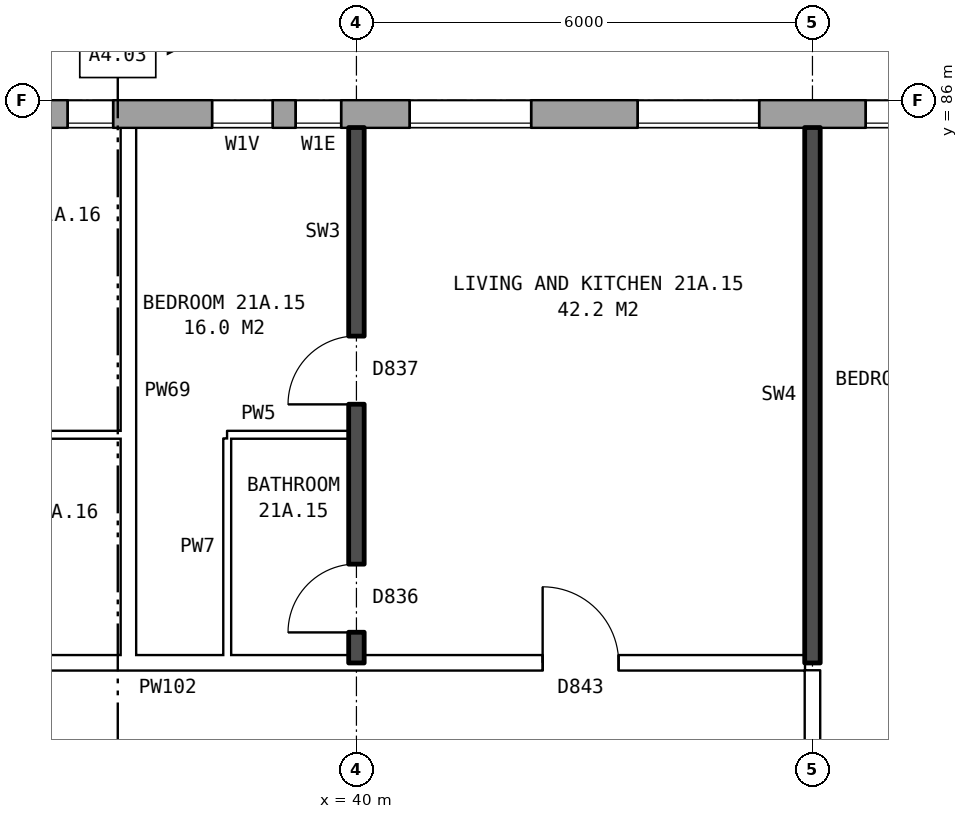
"""IFC4 building model, lengths in metres.
Left out: names, types, materials, properties, quantities, classifications, styles, units other than length and angle.
Written with IfcOpenShell. Run it as: python <this file> out.ifc"""

import sys

from ifc_helpers import new_model, si_unit, direction, frame, frame_2d, origin, place, context, subcontext, project, spatial, rectangle, extrude, element, fill, save


model = new_model("IFC4")
c1 = context("Model", 3, precision=1e-05, world=origin(), true_north=direction((0.0, 1.0)))
c2 = subcontext(c1, "Body", "Model", "MODEL_VIEW")
j1 = project(units=[si_unit("LENGTHUNIT", "METRE"), si_unit("PLANEANGLEUNIT", "RADIAN")], contexts=[c1])
p1 = place(None, origin())
s1 = spatial("IfcSite", under=j1, at=p1, CompositionType="ELEMENT")
p2 = place(p1, origin())
s2 = spatial("IfcBuilding", under=s1, at=p2, CompositionType="ELEMENT")
p3 = place(p2, frame((0.0, 0.0, 77.8)))
s3 = spatial("IfcBuildingStorey", under=s2, at=p3, CompositionType="ELEMENT", Elevation=77.8)
p4 = place(p3, frame((72.925, 85.82, 0.0), z_axis=(0.0, 0.0, 1.0), x_axis=(-1.0, 0.0, 0.0)))
e1 = element("IfcWall", 1, at=p4, inside=s3, PredefinedType="STANDARD", context=c2, shape_type="SweptSolid", body=[
    extrude(rectangle(XDim=46.601, YDim=0.36, at=frame_2d((23.3, 0.0))), origin(), (0.0, 0.0, 1.0), 2.85),
])
p5 = place(p4, frame((0.625, 0.0, 0.8)))
e2 = element("IfcOpeningElement", 2, at=p5, cuts=e1, PredefinedType="OPENING", context=c2, shape_type="SweptSolid", body=[
    extrude(rectangle(XDim=1.6, YDim=1.8, at=frame_2d((0.8, 0.9))), frame((0.0, 0.19, 0.0), z_axis=(0.0, -1.0, 0.0), x_axis=(1.0, 0.0, 0.0)), (0.0, 0.0, 1.0), 0.38),
])
p6 = place(p4, frame((3.625, 0.0, 0.8)))
e3 = element("IfcOpeningElement", 3, at=p6, cuts=e1, PredefinedType="OPENING", context=c2, shape_type="SweptSolid", body=[
    extrude(rectangle(XDim=1.6, YDim=1.8, at=frame_2d((0.8, 0.9))), frame((0.0, 0.19, 0.0), z_axis=(0.0, -1.0, 0.0), x_axis=(1.0, 0.0, 0.0)), (0.0, 0.0, 1.0), 0.38),
])
p7 = place(p4, frame((6.625, 0.0, 0.8)))
e4 = element("IfcOpeningElement", 4, at=p7, cuts=e1, PredefinedType="OPENING", context=c2, shape_type="SweptSolid", body=[
    extrude(rectangle(XDim=1.6, YDim=1.8, at=frame_2d((0.8, 0.9))), frame((0.0, 0.19, 0.0), z_axis=(0.0, -1.0, 0.0), x_axis=(1.0, 0.0, 0.0)), (0.0, 0.0, 1.0), 0.38),
])
p8 = place(p4, frame((9.125, 0.0, 1.65)))
e5 = element("IfcOpeningElement", 5, at=p8, cuts=e1, PredefinedType="OPENING", context=c2, shape_type="SweptSolid", body=[
    extrude(rectangle(XDim=1.4, YDim=0.9, at=frame_2d((0.7, 0.45))), frame((0.0, 0.19, 0.0), z_axis=(0.0, -1.0, 0.0), x_axis=(1.0, 0.0, 0.0)), (0.0, 0.0, 1.0), 0.38),
])
p9 = place(p4, frame((12.625, 0.0, 0.8)))
e6 = element("IfcOpeningElement", 6, at=p9, cuts=e1, PredefinedType="OPENING", context=c2, shape_type="SweptSolid", body=[
    extrude(rectangle(XDim=1.6, YDim=1.8, at=frame_2d((0.8, 0.9))), frame((0.0, 0.19, 0.0), z_axis=(0.0, -1.0, 0.0), x_axis=(1.0, 0.0, 0.0)), (0.0, 0.0, 1.0), 0.38),
])
p10 = place(p4, frame((15.625, 0.0, 0.8)))
e7 = element("IfcOpeningElement", 7, at=p10, cuts=e1, PredefinedType="OPENING", context=c2, shape_type="SweptSolid", body=[
    extrude(rectangle(XDim=1.6, YDim=1.8, at=frame_2d((0.8, 0.9))), frame((0.0, 0.19, 0.0), z_axis=(0.0, -1.0, 0.0), x_axis=(1.0, 0.0, 0.0)), (0.0, 0.0, 1.0), 0.38),
])
p11 = place(p4, frame((18.625, 0.0, 0.8)))
e8 = element("IfcOpeningElement", 8, at=p11, cuts=e1, PredefinedType="OPENING", context=c2, shape_type="SweptSolid", body=[
    extrude(rectangle(XDim=1.6, YDim=1.8, at=frame_2d((0.8, 0.9))), frame((0.0, 0.19, 0.0), z_axis=(0.0, -1.0, 0.0), x_axis=(1.0, 0.0, 0.0)), (0.0, 0.0, 1.0), 0.38),
])
p12 = place(p4, frame((21.625, 0.0, 0.8)))
e9 = element("IfcOpeningElement", 9, at=p12, cuts=e1, PredefinedType="OPENING", context=c2, shape_type="SweptSolid", body=[
    extrude(rectangle(XDim=1.6, YDim=1.8, at=frame_2d((0.8, 0.9))), frame((0.0, 0.19, 0.0), z_axis=(0.0, -1.0, 0.0), x_axis=(1.0, 0.0, 0.0)), (0.0, 0.0, 1.0), 0.38),
])
p13 = place(p4, frame((24.625, 0.0, 0.8)))
e10 = element("IfcOpeningElement", 10, at=p13, cuts=e1, PredefinedType="OPENING", context=c2, shape_type="SweptSolid", body=[
    extrude(rectangle(XDim=1.6, YDim=1.8, at=frame_2d((0.8, 0.9))), frame((0.0, 0.19, 0.0), z_axis=(0.0, -1.0, 0.0), x_axis=(1.0, 0.0, 0.0)), (0.0, 0.0, 1.0), 0.38),
])
p14 = place(p4, frame((27.625, 0.0, 0.8)))
e11 = element("IfcOpeningElement", 11, at=p14, cuts=e1, PredefinedType="OPENING", context=c2, shape_type="SweptSolid", body=[
    extrude(rectangle(XDim=1.6, YDim=1.8, at=frame_2d((0.8, 0.9))), frame((0.0, 0.19, 0.0), z_axis=(0.0, -1.0, 0.0), x_axis=(1.0, 0.0, 0.0)), (0.0, 0.0, 1.0), 0.38),
])
p15 = place(p4, frame((30.625, 0.0, 0.8)))
e12 = element("IfcOpeningElement", 12, at=p15, cuts=e1, PredefinedType="OPENING", context=c2, shape_type="SweptSolid", body=[
    extrude(rectangle(XDim=1.6, YDim=1.8, at=frame_2d((0.8, 0.9))), frame((0.0, 0.19, 0.0), z_axis=(0.0, -1.0, 0.0), x_axis=(1.0, 0.0, 0.0)), (0.0, 0.0, 1.0), 0.38),
])
p16 = place(p4, frame((33.125, 0.0, 0.75)))
e13 = element("IfcOpeningElement", 13, at=p16, cuts=e1, PredefinedType="OPENING", context=c2, shape_type="SweptSolid", body=[
    extrude(rectangle(XDim=0.6, YDim=1.8, at=frame_2d((0.3, 0.9))), frame((0.0, 0.19, 0.0), z_axis=(0.0, -1.0, 0.0), x_axis=(1.0, 0.0, 0.0)), (0.0, 0.0, 1.0), 0.38),
])
p17 = place(p4, frame((36.125, 0.0, 1.6)))
e14 = element("IfcOpeningElement", 14, at=p17, cuts=e1, PredefinedType="OPENING", context=c2, shape_type="SweptSolid", body=[
    extrude(rectangle(XDim=0.6, YDim=0.9, at=frame_2d((0.3, 0.45))), frame((0.0, 0.19, 0.0), z_axis=(0.0, -1.0, 0.0), x_axis=(1.0, 0.0, 0.0)), (0.0, 0.0, 1.0), 0.38),
])
p18 = place(p4, frame((39.625, 0.0, 0.8)))
e15 = element("IfcOpeningElement", 15, at=p18, cuts=e1, PredefinedType="OPENING", context=c2, shape_type="SweptSolid", body=[
    extrude(rectangle(XDim=1.6, YDim=1.8, at=frame_2d((0.8, 0.9))), frame((0.0, 0.19, 0.0), z_axis=(0.0, -1.0, 0.0), x_axis=(1.0, 0.0, 0.0)), (0.0, 0.0, 1.0), 0.38),
])
p19 = place(p4, frame((42.625, 0.0, 0.8)))
e16 = element("IfcOpeningElement", 16, at=p19, cuts=e1, PredefinedType="OPENING", context=c2, shape_type="SweptSolid", body=[
    extrude(rectangle(XDim=1.6, YDim=1.8, at=frame_2d((0.8, 0.9))), frame((0.0, 0.19, 0.0), z_axis=(0.0, -1.0, 0.0), x_axis=(1.0, 0.0, 0.0)), (0.0, 0.0, 1.0), 0.38),
])
p20 = place(p4, frame((11.125, 0.0, 0.15)))
e17 = element("IfcOpeningElement", 17, at=p20, cuts=e1, PredefinedType="OPENING", context=c2, shape_type="SweptSolid", body=[
    extrude(rectangle(XDim=0.6, YDim=0.9, at=frame_2d((0.3, 0.45))), frame((0.0, 0.19, 0.0), z_axis=(0.0, -1.0, 0.0), x_axis=(1.0, 0.0, 0.0)), (0.0, 0.0, 1.0), 0.38),
])
p21 = place(p4, frame((34.025, 0.0, 0.65)))
e18 = element("IfcOpeningElement", 18, at=p21, cuts=e1, PredefinedType="OPENING", context=c2, shape_type="SweptSolid", body=[
    extrude(rectangle(XDim=0.8, YDim=0.9, at=frame_2d((0.4, 0.45))), frame((0.0, 0.19, 0.0), z_axis=(0.0, -1.0, 0.0), x_axis=(1.0, 0.0, 0.0)), (0.0, 0.0, 1.0), 0.38),
])
p22 = place(p4, frame((37.025, 0.0, 0.8)))
e19 = element("IfcOpeningElement", 19, at=p22, cuts=e1, PredefinedType="OPENING", context=c2, shape_type="SweptSolid", body=[
    extrude(rectangle(XDim=1.6, YDim=1.8, at=frame_2d((0.8, 0.9))), frame((0.0, 0.19, 0.0), z_axis=(0.0, -1.0, 0.0), x_axis=(1.0, 0.0, 0.0)), (0.0, 0.0, 1.0), 0.38),
])
p23 = place(p3, frame((23.61, 78.6, 0.0), z_axis=(0.0, 0.0, 1.0), x_axis=(1.0, 0.0, 0.0)))
e20 = element("IfcWall", 20, at=p23, inside=s3, PredefinedType="PARTITIONING", context=c2, shape_type="SweptSolid", body=[
    extrude(rectangle(XDim=22.29, YDim=0.2, at=frame_2d((11.145, 0.0))), origin(), (0.0, 0.0, 1.0), 2.85),
])
p24 = place(p23, frame((18.84, 0.0, 0.0)))
e21 = element("IfcOpeningElement", 21, at=p24, cuts=e20, PredefinedType="OPENING", context=c2, shape_type="SweptSolid", body=[
    extrude(rectangle(XDim=1.0, YDim=2.1, at=frame_2d((0.5, 1.05))), frame((0.0, 0.11, 0.0), z_axis=(0.0, -1.0, 0.0), x_axis=(1.0, 0.0, 0.0)), (0.0, 0.0, 1.0), 0.22),
])
p25 = place(p23, frame((6.89, 0.0, 0.0)))
e22 = element("IfcOpeningElement", 22, at=p25, cuts=e20, PredefinedType="OPENING", context=c2, shape_type="SweptSolid", body=[
    extrude(rectangle(XDim=1.0, YDim=2.1, at=frame_2d((0.5, 1.05))), frame((0.0, 0.11, 0.0), z_axis=(0.0, -1.0, 0.0), x_axis=(1.0, 0.0, 0.0)), (0.0, 0.0, 1.0), 0.22),
])
p26 = place(p3, frame((34.1, 81.6, 0.0), z_axis=(0.0, 0.0, 1.0), x_axis=(1.0, 0.0, 0.0)))
e23 = element("IfcWall", 23, at=p26, inside=s3, PredefinedType="PARTITIONING", context=c2, shape_type="SweptSolid", body=[
    extrude(rectangle(XDim=2.8, YDim=0.1, at=frame_2d((1.4, 0.0))), origin(), (0.0, 0.0, 1.0), 2.85),
])
p27 = place(p3, frame((38.3, 81.6, 0.0), z_axis=(0.0, 0.0, 1.0), x_axis=(1.0, 0.0, 0.0)))
e24 = element("IfcWall", 24, at=p27, inside=s3, PredefinedType="PARTITIONING", context=c2, shape_type="SweptSolid", body=[
    extrude(rectangle(XDim=1.6, YDim=0.1, at=frame_2d((0.8, 0.0))), origin(), (0.0, 0.0, 1.0), 2.85),
])
p28 = place(p3, frame((37.0, 78.7, 0.0), z_axis=(0.0, 0.0, 1.0), x_axis=(0.0, 1.0, 0.0)))
e25 = element("IfcWall", 25, at=p28, inside=s3, PredefinedType="PARTITIONING", context=c2, shape_type="SweptSolid", body=[
    extrude(rectangle(XDim=6.94, YDim=0.2, at=frame_2d((3.47, 0.0))), origin(), (0.0, 0.0, 1.0), 2.85),
])
p29 = place(p3, frame((38.3, 78.7, 0.0), z_axis=(0.0, 0.0, 1.0), x_axis=(0.0, 1.0, 0.0)))
e26 = element("IfcWall", 26, at=p29, inside=s3, PredefinedType="PARTITIONING", context=c2, shape_type="SweptSolid", body=[
    extrude(rectangle(XDim=2.85, YDim=0.1, at=frame_2d((1.425, 0.0))), origin(), (0.0, 0.0, 1.0), 2.85),
])
p30 = place(p3, frame((40.0, 78.6, 0.0), z_axis=(0.0, 0.0, 1.0), x_axis=(0.0, 1.0, 0.0)))
e27 = element("IfcWall", 27, at=p30, inside=s3, PredefinedType="SOLIDWALL", context=c2, shape_type="SweptSolid", body=[
    extrude(rectangle(XDim=7.04, YDim=0.2, at=frame_2d((3.52, 0.0))), origin(), (0.0, 0.0, 1.0), 2.85),
])
p31 = place(p30, frame((3.4, 0.0, 0.0)))
e28 = element("IfcOpeningElement", 28, at=p31, cuts=e27, PredefinedType="OPENING", context=c2, shape_type="SweptSolid", body=[
    extrude(rectangle(XDim=0.9, YDim=2.1, at=frame_2d((0.45, 1.05))), frame((0.0, 0.11, 0.0), z_axis=(0.0, -1.0, 0.0), x_axis=(1.0, 0.0, 0.0)), (0.0, 0.0, 1.0), 0.22),
])
p32 = place(p30, frame((0.4, 0.0, 0.0)))
e29 = element("IfcOpeningElement", 29, at=p32, cuts=e27, PredefinedType="OPENING", context=c2, shape_type="SweptSolid", body=[
    extrude(rectangle(XDim=0.9, YDim=2.1, at=frame_2d((0.45, 1.05))), frame((0.0, 0.11, 0.0), z_axis=(0.0, -1.0, 0.0), x_axis=(1.0, 0.0, 0.0)), (0.0, 0.0, 1.0), 0.22),
])
p33 = place(p3, frame((46.0, 76.3, 0.0), z_axis=(0.0, 0.0, 1.0), x_axis=(0.0, 1.0, 0.0)))
e30 = element("IfcWall", 30, at=p33, inside=s3, PredefinedType="PARTITIONING", context=c2, shape_type="SweptSolid", body=[
    extrude(rectangle(XDim=2.2, YDim=0.2, at=frame_2d((1.1, 0.0))), origin(), (0.0, 0.0, 1.0), 2.85),
])
p34 = place(p3, frame((46.0, 78.6, 0.0), z_axis=(0.0, 0.0, 1.0), x_axis=(0.0, 1.0, 0.0)))
e31 = element("IfcWall", 31, at=p34, inside=s3, PredefinedType="SOLIDWALL", context=c2, shape_type="SweptSolid", body=[
    extrude(rectangle(XDim=7.04, YDim=0.2, at=frame_2d((3.52, 0.0))), origin(), (0.0, 0.0, 1.0), 2.85),
])
p35 = place(p13, origin())
e32 = element("IfcWindow", 32, at=p35, inside=s3, PartitioningType="SINGLE_PANEL", PredefinedType="WINDOW", context=c2, shape_type="SweptSolid", body=[
    extrude(rectangle(XDim=1.6, YDim=1.8, at=frame_2d((0.8, 0.9))), frame((0.0, 0.15, 0.0), z_axis=(0.0, -1.0, 0.0), x_axis=(1.0, 0.0, 0.0)), (0.0, 0.0, 1.0), 0.06),
])
fill(e10, e32)
p36 = place(p14, origin())
e33 = element("IfcWindow", 33, at=p36, inside=s3, PartitioningType="SINGLE_PANEL", PredefinedType="WINDOW", context=c2, shape_type="SweptSolid", body=[
    extrude(rectangle(XDim=1.6, YDim=1.8, at=frame_2d((0.8, 0.9))), frame((0.0, 0.15, 0.0), z_axis=(0.0, -1.0, 0.0), x_axis=(1.0, 0.0, 0.0)), (0.0, 0.0, 1.0), 0.06),
])
fill(e11, e33)
p37 = place(p15, origin())
e34 = element("IfcWindow", 34, at=p37, inside=s3, PartitioningType="SINGLE_PANEL", PredefinedType="WINDOW", context=c2, shape_type="SweptSolid", body=[
    extrude(rectangle(XDim=1.6, YDim=1.8, at=frame_2d((0.8, 0.9))), frame((0.0, 0.15, 0.0), z_axis=(0.0, -1.0, 0.0), x_axis=(1.0, 0.0, 0.0)), (0.0, 0.0, 1.0), 0.06),
])
fill(e12, e34)
p38 = place(p16, origin())
e35 = element("IfcWindow", 35, at=p38, inside=s3, PartitioningType="SINGLE_PANEL", PredefinedType="WINDOW", context=c2, shape_type="SweptSolid", body=[
    extrude(rectangle(XDim=0.6, YDim=1.8, at=frame_2d((0.3, 0.9))), frame((0.0, 0.15, 0.0), z_axis=(0.0, -1.0, 0.0), x_axis=(1.0, 0.0, 0.0)), (0.0, 0.0, 1.0), 0.06),
])
fill(e13, e35)
p39 = place(p17, origin())
e36 = element("IfcWindow", 36, at=p39, inside=s3, PartitioningType="SINGLE_PANEL", PredefinedType="WINDOW", context=c2, shape_type="SweptSolid", body=[
    extrude(rectangle(XDim=0.6, YDim=0.9, at=frame_2d((0.3, 0.45))), frame((0.0, 0.15, 0.0), z_axis=(0.0, -1.0, 0.0), x_axis=(1.0, 0.0, 0.0)), (0.0, 0.0, 1.0), 0.06),
])
fill(e14, e36)
p40 = place(p31, origin())
e37 = element("IfcDoor", 37, at=p40, inside=s3, OperationType="SINGLE_SWING_LEFT", PredefinedType="DOOR", context=c2, shape_type="SweptSolid", body=[
    extrude(rectangle(XDim=0.9, YDim=2.1, at=frame_2d((0.45, 1.05))), frame((0.0, 0.025, 0.0), z_axis=(0.0, -1.0, 0.0), x_axis=(1.0, 0.0, 0.0)), (0.0, 0.0, 1.0), 0.05),
])
fill(e28, e37)
p41 = place(p24, origin())
e38 = element("IfcDoor", 38, at=p41, inside=s3, OperationType="SINGLE_SWING_LEFT", PredefinedType="DOOR", context=c2, shape_type="SweptSolid", body=[
    extrude(rectangle(XDim=1.0, YDim=2.1, at=frame_2d((0.5, 1.05))), frame((0.0, 0.025, 0.0), z_axis=(0.0, -1.0, 0.0), x_axis=(1.0, 0.0, 0.0)), (0.0, 0.0, 1.0), 0.05),
])
fill(e21, e38)
p42 = place(p32, origin())
e39 = element("IfcDoor", 39, at=p42, inside=s3, OperationType="SINGLE_SWING_LEFT", PredefinedType="DOOR", context=c2, shape_type="SweptSolid", body=[
    extrude(rectangle(XDim=0.9, YDim=2.1, at=frame_2d((0.45, 1.05))), frame((0.0, 0.025, 0.0), z_axis=(0.0, -1.0, 0.0), x_axis=(1.0, 0.0, 0.0)), (0.0, 0.0, 1.0), 0.05),
])
fill(e29, e39)
p43 = place(p21, origin())
e40 = element("IfcWindow", 40, at=p43, inside=s3, PartitioningType="SINGLE_PANEL", PredefinedType="WINDOW", context=c2, shape_type="SweptSolid", body=[
    extrude(rectangle(XDim=0.8, YDim=0.9, at=frame_2d((0.4, 0.45))), frame((0.0, 0.15, 0.0), z_axis=(0.0, -1.0, 0.0), x_axis=(1.0, 0.0, 0.0)), (0.0, 0.0, 1.0), 0.06),
])
fill(e18, e40)
save(model, sys.argv[1])
